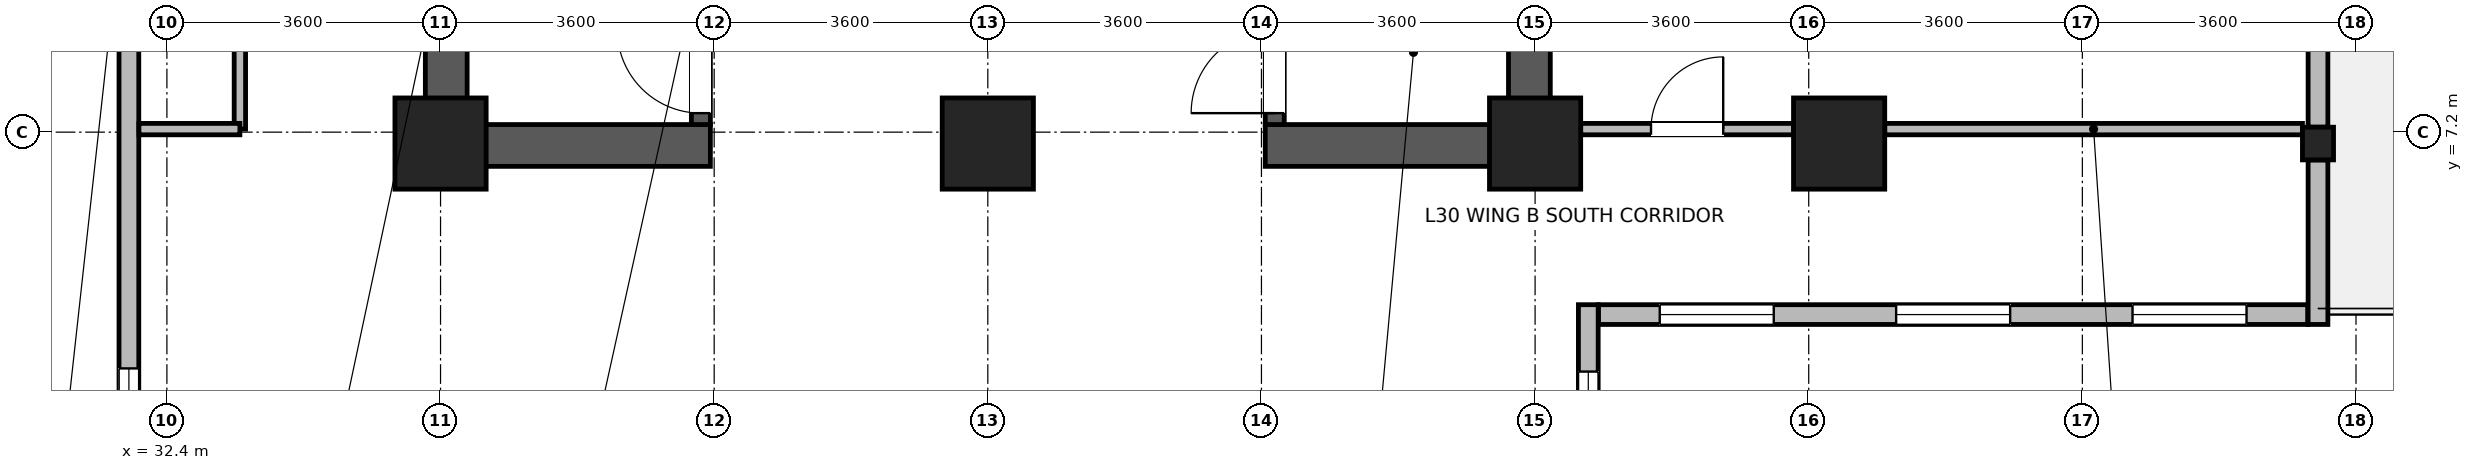
"""IFC4 building model, lengths in metres.
Left out: names, types, materials, properties, quantities, classifications, styles, units other than length and angle.
Written with IfcOpenShell. Run it as: python <this file> out.ifc"""

import sys

from ifc_helpers import new_model, si_unit, direction, frame, frame_2d, origin, origin_2d, place, context, subcontext, project, spatial, rectangle, i_section, extrude, source, transform, mapped, element, fill, save


model = new_model("IFC4")
c1 = context("Model", 3, precision=1e-05, world=origin(), true_north=direction((0.0, 1.0)))
c2 = subcontext(c1, "Body", "Model", "MODEL_VIEW")
j1 = project(units=[si_unit("LENGTHUNIT", "METRE"), si_unit("PLANEANGLEUNIT", "RADIAN")], contexts=[c1])
p1 = place(None, origin())
s1 = spatial("IfcSite", under=j1, at=p1, CompositionType="ELEMENT")
p2 = place(p1, origin())
s2 = spatial("IfcBuilding", under=s1, at=p2, CompositionType="ELEMENT")
p3 = place(p2, frame((0.0, 0.0, 119.3)))
s3 = spatial("IfcBuildingStorey", under=s2, at=p3, CompositionType="ELEMENT", Elevation=119.3)
for number, where, z_axis, x_axis in (
    (1, (36.075, 6.75, 0.0), (0.0, 0.0, 1.0), (0.0, 1.0, 0.0)),
    (2, (50.325, 6.75, 0.0), (0.0, 0.0, 1.0), (0.0, 1.0, 0.0)),
):
    element("IfcWall", number, at=place(p3, frame(where, z_axis=z_axis, x_axis=x_axis)), inside=s3, PredefinedType="SHEAR", context=c2, shape_type="SweptSolid", body=[
        extrude(rectangle(XDim=8.1, YDim=0.55, at=frame_2d((4.05, 0.0))), origin(), (0.0, 0.0, 1.0), 3.45),
    ])
for number, where, z_axis, x_axis in (
    (3, (36.35, 7.025, 0.0), (0.0, 0.0, 1.0), (1.0, 0.0, 0.0)),
    (4, (46.85, 7.025, 0.0), (0.0, 0.0, 1.0), (1.0, 0.0, 0.0)),
):
    element("IfcWall", number, at=place(p3, frame(where, z_axis=z_axis, x_axis=x_axis)), inside=s3, PredefinedType="SHEAR", context=c2, shape_type="SweptSolid", body=[
        extrude(rectangle(XDim=3.2, YDim=0.55, at=frame_2d((1.6, 0.0))), origin(), (0.0, 0.0, 1.0), 3.45),
    ])
p4 = place(p3, frame((39.425, 7.3, 0.0), z_axis=(0.0, 0.0, 1.0), x_axis=(0.0, 1.0, 0.0)))
e5 = element("IfcWall", 5, at=p4, inside=s3, PredefinedType="SHEAR", context=c2, shape_type="SweptSolid", body=[
    extrude(rectangle(XDim=7.0, YDim=0.25, at=frame_2d((3.5, 0.0))), origin(), (0.0, 0.0, 1.0), 3.45),
])
p5 = place(p4, frame((0.15, 0.0, 0.0)))
e6 = element("IfcOpeningElement", 6, at=p5, cuts=e5, PredefinedType="OPENING", context=c2, shape_type="SweptSolid", body=[
    extrude(rectangle(XDim=1.1, YDim=2.08, at=frame_2d((0.55, 1.04))), frame((0.0, 0.135, 0.0), z_axis=(0.0, -1.0, 0.0), x_axis=(1.0, 0.0, 0.0)), (0.0, 0.0, 1.0), 0.27),
])
p6 = place(p3, frame((46.975, 7.3, 0.0), z_axis=(0.0, 0.0, 1.0), x_axis=(0.0, 1.0, 0.0)))
e7 = element("IfcWall", 7, at=p6, inside=s3, PredefinedType="SHEAR", context=c2, shape_type="SweptSolid", body=[
    extrude(rectangle(XDim=7.0, YDim=0.25, at=frame_2d((3.5, 0.0))), origin(), (0.0, 0.0, 1.0), 3.45),
])
p7 = place(p6, frame((0.15, 0.0, 0.0)))
e8 = element("IfcOpeningElement", 8, at=p7, cuts=e7, PredefinedType="OPENING", context=c2, shape_type="SweptSolid", body=[
    extrude(rectangle(XDim=1.1, YDim=2.08, at=frame_2d((0.55, 1.04))), frame((0.0, 0.135, 0.0), z_axis=(0.0, -1.0, 0.0), x_axis=(1.0, 0.0, 0.0)), (0.0, 0.0, 1.0), 0.27),
])
m1 = source(origin(), c2, "Body", "SweptSolid", [
    extrude(rectangle(XDim=1.2, YDim=1.2, at=origin_2d()), origin(), (0.0, 0.0, 1.0), 3.7),
])
for number, where, z_axis, x_axis in (
    (9, (36.0, 7.05, 0.0), (0.0, 0.0, 1.0), (1.0, 0.0, 0.0)),
    (10, (43.2, 7.05, 0.0), (0.0, 0.0, 1.0), (1.0, 0.0, 0.0)),
    (11, (50.4, 7.05, 0.0), (0.0, 0.0, 1.0), (1.0, 0.0, 0.0)),
    (12, (54.4, 7.05, 0.0), (0.0, 0.0, 1.0), (1.0, 0.0, 0.0)),
):
    element("IfcColumn", number, at=place(p3, frame(where, z_axis=z_axis, x_axis=x_axis)), inside=s3, PredefinedType="COLUMN", context=c2, shape_type="MappedRepresentation", body=[
        mapped(m1, transform((0.0, 0.0, 0.0), x_axis=(1.0, 0.0, 0.0), y_axis=(0.0, 1.0, 0.0), z_axis=(0.0, 0.0, 1.0), scale=1.0)),
    ])
m2 = source(origin(), c2, "Body", "SweptSolid", [
    extrude(i_section(OverallWidth=0.409, OverallDepth=0.43, WebThickness=0.024, FlangeThickness=0.033, FilletRadius=0.015, at=origin_2d()), origin(), (0.0, 0.0, 1.0), 3.7),
])
p8 = place(p3, frame((60.7, 7.05, 0.0), z_axis=(0.0, 0.0, 1.0), x_axis=(1.0, 0.0, 0.0)))
e13 = element("IfcColumn", 13, at=p8, inside=s3, PredefinedType="COLUMN", context=c2, shape_type="MappedRepresentation", body=[
    mapped(m2, transform((0.0, 0.0, 0.0), x_axis=(1.0, 0.0, 0.0), y_axis=(0.0, 1.0, 0.0), z_axis=(0.0, 0.0, 1.0), scale=1.0)),
])
p9 = place(p3, frame((51.1, 4.93, 0.0), z_axis=(0.0, 0.0, 1.0), x_axis=(0.0, -1.0, 0.0)))
e14 = element("IfcWall", 14, at=p9, inside=s3, PredefinedType="STANDARD", context=c2, shape_type="SweptSolid", body=[
    extrude(rectangle(XDim=3.26, YDim=0.26, at=frame_2d((1.63, 0.0))), origin(), (0.0, 0.0, 1.0), 3.43),
])
p10 = place(p9, frame((0.88, 0.0, 0.85)))
e15 = element("IfcOpeningElement", 15, at=p10, cuts=e14, PredefinedType="OPENING", context=c2, shape_type="SweptSolid", body=[
    extrude(rectangle(XDim=1.5, YDim=1.85, at=frame_2d((0.75, 0.925))), frame((0.0, 0.14, 0.0), z_axis=(0.0, -1.0, 0.0), x_axis=(1.0, 0.0, 0.0)), (0.0, 0.0, 1.0), 0.28),
])
p11 = place(p3, frame((60.565, 4.8, 0.0), z_axis=(0.0, 0.0, 1.0), x_axis=(-1.0, 0.0, 0.0)))
e16 = element("IfcWall", 16, at=p11, inside=s3, PredefinedType="STANDARD", context=c2, shape_type="SweptSolid", body=[
    extrude(rectangle(XDim=9.33, YDim=0.26, at=frame_2d((4.665, 0.0))), origin(), (0.0, 0.0, 1.0), 3.43),
])
p12 = place(p11, frame((0.805, 0.0, 0.85)))
e17 = element("IfcOpeningElement", 17, at=p12, cuts=e16, PredefinedType="OPENING", context=c2, shape_type="SweptSolid", body=[
    extrude(rectangle(XDim=1.5, YDim=1.85, at=frame_2d((0.75, 0.925))), frame((0.0, 0.14, 0.0), z_axis=(0.0, -1.0, 0.0), x_axis=(1.0, 0.0, 0.0)), (0.0, 0.0, 1.0), 0.28),
])
p13 = place(p11, frame((3.915, 0.0, 0.85)))
e18 = element("IfcOpeningElement", 18, at=p13, cuts=e16, PredefinedType="OPENING", context=c2, shape_type="SweptSolid", body=[
    extrude(rectangle(XDim=1.5, YDim=1.85, at=frame_2d((0.75, 0.925))), frame((0.0, 0.14, 0.0), z_axis=(0.0, -1.0, 0.0), x_axis=(1.0, 0.0, 0.0)), (0.0, 0.0, 1.0), 0.28),
])
p14 = place(p11, frame((7.025, 0.0, 0.85)))
e19 = element("IfcOpeningElement", 19, at=p14, cuts=e16, PredefinedType="OPENING", context=c2, shape_type="SweptSolid", body=[
    extrude(rectangle(XDim=1.5, YDim=1.85, at=frame_2d((0.75, 0.925))), frame((0.0, 0.14, 0.0), z_axis=(0.0, -1.0, 0.0), x_axis=(1.0, 0.0, 0.0)), (0.0, 0.0, 1.0), 0.28),
])
p15 = place(p3, frame((60.7, 6.834, 0.0), z_axis=(0.0, 0.0, 1.0), x_axis=(0.0, -1.0, 0.0)))
e20 = element("IfcWall", 20, at=p15, inside=s3, PredefinedType="STANDARD", context=c2, shape_type="SweptSolid", body=[
    extrude(rectangle(XDim=2.164, YDim=0.26, at=frame_2d((1.082, 0.0))), origin(), (0.0, 0.0, 1.0), 3.43),
])
p16 = place(p3, frame((60.7, 14.334, 0.0), z_axis=(0.0, 0.0, 1.0), x_axis=(0.0, -1.0, 0.0)))
e21 = element("IfcWall", 21, at=p16, inside=s3, PredefinedType="STANDARD", context=c2, shape_type="SweptSolid", body=[
    extrude(rectangle(XDim=7.068, YDim=0.26, at=frame_2d((3.534, 0.0))), origin(), (0.0, 0.0, 1.0), 2.98),
])
p17 = place(p16, frame((2.784, 0.0, 0.0)))
e22 = element("IfcOpeningElement", 22, at=p17, cuts=e21, PredefinedType="OPENING", context=c2, shape_type="SweptSolid", body=[
    extrude(rectangle(XDim=1.5, YDim=2.15, at=frame_2d((0.75, 1.075))), frame((0.0, 0.14, 0.0), z_axis=(0.0, -1.0, 0.0), x_axis=(1.0, 0.0, 0.0)), (0.0, 0.0, 1.0), 0.28),
])
p18 = place(p16, frame((1.017, 0.0, 0.85)))
e23 = element("IfcOpeningElement", 23, at=p18, cuts=e21, PredefinedType="OPENING", context=c2, shape_type="SweptSolid", body=[
    extrude(rectangle(XDim=1.5, YDim=1.85, at=frame_2d((0.75, 0.925))), frame((0.0, 0.14, 0.0), z_axis=(0.0, -1.0, 0.0), x_axis=(1.0, 0.0, 0.0)), (0.0, 0.0, 1.0), 0.28),
])
p19 = place(p16, frame((4.551, 0.0, 0.85)))
e24 = element("IfcOpeningElement", 24, at=p19, cuts=e21, PredefinedType="OPENING", context=c2, shape_type="SweptSolid", body=[
    extrude(rectangle(XDim=1.5, YDim=1.85, at=frame_2d((0.75, 0.925))), frame((0.0, 0.14, 0.0), z_axis=(0.0, -1.0, 0.0), x_axis=(1.0, 0.0, 0.0)), (0.0, 0.0, 1.0), 0.28),
])
p20 = place(p3, frame((31.9, 1.67, 0.0), z_axis=(0.0, 0.0, 1.0), x_axis=(0.0, 1.0, 0.0)))
e25 = element("IfcWall", 25, at=p20, inside=s3, PredefinedType="STANDARD", context=c2, shape_type="SweptSolid", body=[
    extrude(rectangle(XDim=20.06, YDim=0.26, at=frame_2d((10.03, 0.0))), origin(), (0.0, 0.0, 1.0), 3.43),
])
p21 = place(p20, frame((0.922, 0.0, 0.85)))
e26 = element("IfcOpeningElement", 26, at=p21, cuts=e25, PredefinedType="OPENING", context=c2, shape_type="SweptSolid", body=[
    extrude(rectangle(XDim=1.5, YDim=1.85, at=frame_2d((0.75, 0.925))), frame((0.0, 0.14, 0.0), z_axis=(0.0, -1.0, 0.0), x_axis=(1.0, 0.0, 0.0)), (0.0, 0.0, 1.0), 0.28),
])
p22 = place(p20, frame((7.608, 0.0, 0.85)))
e27 = element("IfcOpeningElement", 27, at=p22, cuts=e25, PredefinedType="OPENING", context=c2, shape_type="SweptSolid", body=[
    extrude(rectangle(XDim=1.5, YDim=1.85, at=frame_2d((0.75, 0.925))), frame((0.0, 0.14, 0.0), z_axis=(0.0, -1.0, 0.0), x_axis=(1.0, 0.0, 0.0)), (0.0, 0.0, 1.0), 0.28),
])
p23 = place(p20, frame((10.952, 0.0, 0.85)))
e28 = element("IfcOpeningElement", 28, at=p23, cuts=e25, PredefinedType="OPENING", context=c2, shape_type="SweptSolid", body=[
    extrude(rectangle(XDim=1.5, YDim=1.85, at=frame_2d((0.75, 0.925))), frame((0.0, 0.14, 0.0), z_axis=(0.0, -1.0, 0.0), x_axis=(1.0, 0.0, 0.0)), (0.0, 0.0, 1.0), 0.28),
])
p24 = place(p20, frame((14.295, 0.0, 0.85)))
e29 = element("IfcOpeningElement", 29, at=p24, cuts=e25, PredefinedType="OPENING", context=c2, shape_type="SweptSolid", body=[
    extrude(rectangle(XDim=1.5, YDim=1.85, at=frame_2d((0.75, 0.925))), frame((0.0, 0.14, 0.0), z_axis=(0.0, -1.0, 0.0), x_axis=(1.0, 0.0, 0.0)), (0.0, 0.0, 1.0), 0.28),
])
p25 = place(p20, frame((17.638, 0.0, 0.85)))
e30 = element("IfcOpeningElement", 30, at=p25, cuts=e25, PredefinedType="OPENING", context=c2, shape_type="SweptSolid", body=[
    extrude(rectangle(XDim=1.5, YDim=1.85, at=frame_2d((0.75, 0.925))), frame((0.0, 0.14, 0.0), z_axis=(0.0, -1.0, 0.0), x_axis=(1.0, 0.0, 0.0)), (0.0, 0.0, 1.0), 0.28),
])
p26 = place(p3, frame((51.0, 7.24, 0.0), z_axis=(0.0, 0.0, 1.0), x_axis=(1.0, 0.0, 0.0)))
e31 = element("IfcWall", 31, at=p26, inside=s3, PredefinedType="PARTITIONING", context=c2, shape_type="SweptSolid", body=[
    extrude(rectangle(XDim=2.8, YDim=0.15, at=frame_2d((1.4, 0.0))), origin(), (0.0, 0.0, 1.0), 2.78),
])
p27 = place(p26, frame((0.925, 0.0, 0.0)))
e32 = element("IfcOpeningElement", 32, at=p27, cuts=e31, PredefinedType="OPENING", context=c2, shape_type="SweptSolid", body=[
    extrude(rectangle(XDim=0.95, YDim=2.1, at=frame_2d((0.475, 1.05))), frame((0.0, 0.085, 0.0), z_axis=(0.0, -1.0, 0.0), x_axis=(1.0, 0.0, 0.0)), (0.0, 0.0, 1.0), 0.17),
])
p28 = place(p3, frame((55.0, 7.24, 0.0), z_axis=(0.0, 0.0, 1.0), x_axis=(1.0, 0.0, 0.0)))
e33 = element("IfcWall", 33, at=p28, inside=s3, PredefinedType="PARTITIONING", context=c2, shape_type="SweptSolid", body=[
    extrude(rectangle(XDim=5.496, YDim=0.15, at=frame_2d((2.748, 0.0))), origin(), (0.0, 0.0, 1.0), 2.78),
])
p29 = place(p3, frame((33.36, 7.24, 0.0), z_axis=(0.0, 0.0, 1.0), x_axis=(0.0, 1.0, 0.0)))
e34 = element("IfcWall", 34, at=p29, inside=s3, PredefinedType="PARTITIONING", context=c2, shape_type="SweptSolid", body=[
    extrude(rectangle(XDim=7.26, YDim=0.15, at=frame_2d((3.63, 0.0))), origin(), (0.0, 0.0, 1.0), 3.43),
])
p30 = place(p29, frame((2.98, 0.0, 0.0)))
e35 = element("IfcOpeningElement", 35, at=p30, cuts=e34, PredefinedType="OPENING", context=c2, shape_type="SweptSolid", body=[
    extrude(rectangle(XDim=1.3, YDim=2.12, at=frame_2d((0.65, 1.06))), frame((0.0, 0.085, 0.0), z_axis=(0.0, -1.0, 0.0), x_axis=(1.0, 0.0, 0.0)), (0.0, 0.0, 1.0), 0.17),
])
p31 = place(p3, frame((32.032, 7.24, 0.0), z_axis=(0.0, 0.0, 1.0), x_axis=(1.0, 0.0, 0.0)))
e36 = element("IfcWall", 36, at=p31, inside=s3, PredefinedType="PARTITIONING", context=c2, shape_type="SweptSolid", body=[
    extrude(rectangle(XDim=1.328, YDim=0.15, at=frame_2d((0.664, 0.0))), origin(), (0.0, 0.0, 1.0), 3.43),
])
p32 = place(p10, origin())
e37 = element("IfcWindow", 37, at=p32, inside=s3, PartitioningType="SINGLE_PANEL", PredefinedType="WINDOW", context=c2, shape_type="SweptSolid", body=[
    extrude(rectangle(XDim=1.5, YDim=1.85, at=frame_2d((0.75, 0.925))), frame((0.0, 0.03, 0.0), z_axis=(0.0, -1.0, 0.0), x_axis=(1.0, 0.0, 0.0)), (0.0, 0.0, 1.0), 0.06),
])
fill(e15, e37)
p33 = place(p12, origin())
e38 = element("IfcWindow", 38, at=p33, inside=s3, PartitioningType="SINGLE_PANEL", PredefinedType="WINDOW", context=c2, shape_type="SweptSolid", body=[
    extrude(rectangle(XDim=1.5, YDim=1.85, at=frame_2d((0.75, 0.925))), frame((0.0, 0.03, 0.0), z_axis=(0.0, -1.0, 0.0), x_axis=(1.0, 0.0, 0.0)), (0.0, 0.0, 1.0), 0.06),
])
fill(e17, e38)
p34 = place(p13, origin())
e39 = element("IfcWindow", 39, at=p34, inside=s3, PartitioningType="SINGLE_PANEL", PredefinedType="WINDOW", context=c2, shape_type="SweptSolid", body=[
    extrude(rectangle(XDim=1.5, YDim=1.85, at=frame_2d((0.75, 0.925))), frame((0.0, 0.03, 0.0), z_axis=(0.0, -1.0, 0.0), x_axis=(1.0, 0.0, 0.0)), (0.0, 0.0, 1.0), 0.06),
])
fill(e18, e39)
p35 = place(p14, origin())
e40 = element("IfcWindow", 40, at=p35, inside=s3, PartitioningType="SINGLE_PANEL", PredefinedType="WINDOW", context=c2, shape_type="SweptSolid", body=[
    extrude(rectangle(XDim=1.5, YDim=1.85, at=frame_2d((0.75, 0.925))), frame((0.0, 0.03, 0.0), z_axis=(0.0, -1.0, 0.0), x_axis=(1.0, 0.0, 0.0)), (0.0, 0.0, 1.0), 0.06),
])
fill(e19, e40)
p36 = place(p21, origin())
e41 = element("IfcWindow", 41, at=p36, inside=s3, PartitioningType="SINGLE_PANEL", PredefinedType="WINDOW", context=c2, shape_type="SweptSolid", body=[
    extrude(rectangle(XDim=1.5, YDim=1.85, at=frame_2d((0.75, 0.925))), frame((0.0, 0.03, 0.0), z_axis=(0.0, -1.0, 0.0), x_axis=(1.0, 0.0, 0.0)), (0.0, 0.0, 1.0), 0.06),
])
fill(e26, e41)
p37 = place(p5, origin())
e42 = element("IfcDoor", 42, at=p37, inside=s3, OperationType="SINGLE_SWING_RIGHT", PredefinedType="DOOR", context=c2, shape_type="SweptSolid", body=[
    extrude(rectangle(XDim=1.1, YDim=2.08, at=frame_2d((0.55, 1.04))), frame((0.0, 0.025, 0.0), z_axis=(0.0, -1.0, 0.0), x_axis=(1.0, 0.0, 0.0)), (0.0, 0.0, 1.0), 0.05),
])
fill(e6, e42)
p38 = place(p7, origin())
e43 = element("IfcDoor", 43, at=p38, inside=s3, OperationType="SINGLE_SWING_LEFT", PredefinedType="DOOR", context=c2, shape_type="SweptSolid", body=[
    extrude(rectangle(XDim=1.1, YDim=2.08, at=frame_2d((0.55, 1.04))), frame((0.0, 0.025, 0.0), z_axis=(0.0, -1.0, 0.0), x_axis=(1.0, 0.0, 0.0)), (0.0, 0.0, 1.0), 0.05),
])
fill(e8, e43)
p39 = place(p27, origin())
e44 = element("IfcDoor", 44, at=p39, inside=s3, OperationType="SINGLE_SWING_RIGHT", PredefinedType="DOOR", context=c2, shape_type="SweptSolid", body=[
    extrude(rectangle(XDim=0.95, YDim=2.1, at=frame_2d((0.475, 1.05))), frame((0.0, 0.025, 0.0), z_axis=(0.0, -1.0, 0.0), x_axis=(1.0, 0.0, 0.0)), (0.0, 0.0, 1.0), 0.05),
])
fill(e32, e44)
save(model, sys.argv[1])
